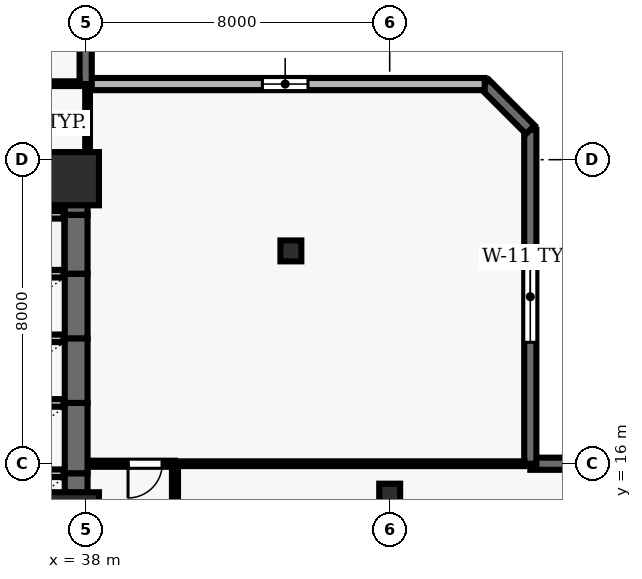
"""IFC4 building model, lengths in metres.
Left out: names, types, materials, properties, quantities, classifications, styles, units other than length and angle.
Written with IfcOpenShell. Run it as: python <this file> out.ifc"""

import sys

from ifc_helpers import new_model, si_unit, direction, frame, frame_2d, origin, origin_2d, place, context, subcontext, project, spatial, rectangle, hollow_rectangle, extrude, element, fill, save


model = new_model("IFC4")
c1 = context("Model", 3, precision=1e-05, world=origin(), true_north=direction((0.0, 1.0)))
c2 = subcontext(c1, "Body", "Model", "MODEL_VIEW")
j1 = project(units=[si_unit("LENGTHUNIT", "METRE"), si_unit("PLANEANGLEUNIT", "RADIAN")], contexts=[c1])
p1 = place(None, origin())
s1 = spatial("IfcSite", under=j1, at=p1, CompositionType="ELEMENT")
p2 = place(p1, origin())
s2 = spatial("IfcBuilding", under=s1, at=p2, CompositionType="ELEMENT")
p3 = place(p2, frame((0.0, 0.0, 73.9)))
s3 = spatial("IfcBuildingStorey", under=s2, at=p3, CompositionType="ELEMENT", Elevation=73.9)
for number, where, z_axis, x_axis in (
    (1, (37.65, 14.55, 0.0), (0.0, 0.0, 1.0), (1.0, 0.0, 0.0)),
    (2, (37.65, 23.5, 0.0), (0.0, 0.0, 1.0), (1.0, 0.0, 0.0)),
):
    element("IfcColumn", number, at=place(p3, frame(where, z_axis=z_axis, x_axis=x_axis)), inside=s3, PredefinedType="COLUMN", context=c2, shape_type="SweptSolid", body=[
        extrude(rectangle(XDim=1.4, YDim=1.4, at=origin_2d()), origin(), (0.0, 0.0, 1.0), 3.9),
    ])
for number, where, z_axis, x_axis in (
    (3, (46.0, 15.2, 0.0), (0.0, 0.0, 1.0), (1.0, 0.0, 0.0)),
    (4, (43.4, 21.6, 0.0), (0.0, 0.0, 1.0), (1.0, 0.0, 0.0)),
):
    element("IfcColumn", number, at=place(p3, frame(where, z_axis=z_axis, x_axis=x_axis)), inside=s3, PredefinedType="COLUMN", context=c2, shape_type="SweptSolid", body=[
        extrude(hollow_rectangle(XDim=0.55, YDim=0.55, WallThickness=0.025, at=origin_2d()), origin(), (0.0, 0.0, 1.0), 3.9),
    ])
p4 = place(p3, frame((73.5, 16.0, 0.0), z_axis=(0.0, 0.0, 1.0), x_axis=(-1.0, 0.0, 0.0)))
e5 = element("IfcWall", 5, at=p4, inside=s3, PredefinedType="SOLIDWALL", context=c2, shape_type="SweptSolid", body=[
    extrude(rectangle(XDim=23.8, YDim=0.32, at=frame_2d((11.9, 0.0))), origin(), (0.0, 0.0, 1.0), 3.69),
])
p5 = place(p4, frame((12.4, 0.0, 0.0)))
e6 = element("IfcOpeningElement", 6, at=p5, cuts=e5, PredefinedType="OPENING", context=c2, shape_type="SweptSolid", body=[
    extrude(rectangle(XDim=1.0, YDim=2.2, at=frame_2d((0.5, 1.1))), frame((0.0, 0.17, 0.0), z_axis=(0.0, -1.0, 0.0), x_axis=(1.0, 0.0, 0.0)), (0.0, 0.0, 1.0), 0.34),
])
p6 = place(p4, frame((2.075, 0.0, 0.9)))
e7 = element("IfcOpeningElement", 7, at=p6, cuts=e5, PredefinedType="OPENING", context=c2, shape_type="SweptSolid", body=[
    extrude(rectangle(XDim=1.8, YDim=2.2, at=frame_2d((0.9, 1.1))), frame((0.0, 0.17, 0.0), z_axis=(0.0, -1.0, 0.0), x_axis=(1.0, 0.0, 0.0)), (0.0, 0.0, 1.0), 0.34),
])
p7 = place(p3, frame((49.7, 16.0, 0.0), z_axis=(0.0, 0.0, 1.0), x_axis=(0.0, 1.0, 0.0)))
e8 = element("IfcWall", 8, at=p7, inside=s3, PredefinedType="SOLIDWALL", context=c2, shape_type="SweptSolid", body=[
    extrude(rectangle(XDim=8.79, YDim=0.32, at=frame_2d((4.395, 0.0))), origin(), (0.0, 0.0, 1.0), 3.69),
])
p8 = place(p7, frame((3.195, 0.0, 0.9)))
e9 = element("IfcOpeningElement", 9, at=p8, cuts=e8, PredefinedType="OPENING", context=c2, shape_type="SweptSolid", body=[
    extrude(rectangle(XDim=2.4, YDim=2.2, at=frame_2d((1.2, 1.1))), frame((0.0, 0.17, 0.0), z_axis=(0.0, -1.0, 0.0), x_axis=(1.0, 0.0, 0.0)), (0.0, 0.0, 1.0), 0.34),
])
p9 = place(p3, frame((49.7, 24.79, 0.0), z_axis=(0.0, 0.0, 1.0), x_axis=(-0.707106781187, 0.707106781187, 0.0)))
e10 = element("IfcWall", 10, at=p9, inside=s3, PredefinedType="SOLIDWALL", context=c2, shape_type="SweptSolid", body=[
    extrude(rectangle(XDim=1.697, YDim=0.32, at=frame_2d((0.849, 0.0))), origin(), (0.0, 0.0, 1.0), 3.69),
])
p10 = place(p3, frame((48.5, 25.99, 0.0), z_axis=(0.0, 0.0, 1.0), x_axis=(-1.0, 0.0, 0.0)))
e11 = element("IfcWall", 11, at=p10, inside=s3, PredefinedType="SOLIDWALL", context=c2, shape_type="SweptSolid", body=[
    extrude(rectangle(XDim=10.5, YDim=0.32, at=frame_2d((5.25, 0.0))), origin(), (0.0, 0.0, 1.0), 3.69),
])
p11 = place(p10, frame((4.65, 0.0, 0.9)))
e12 = element("IfcOpeningElement", 12, at=p11, cuts=e11, PredefinedType="OPENING", context=c2, shape_type="SweptSolid", body=[
    extrude(rectangle(XDim=1.2, YDim=1.6, at=frame_2d((0.6, 0.8))), frame((0.0, 0.17, 0.0), z_axis=(0.0, -1.0, 0.0), x_axis=(1.0, 0.0, 0.0)), (0.0, 0.0, 1.0), 0.34),
])
p12 = place(p3, frame((38.0, 25.99, 0.0), z_axis=(0.0, 0.0, 1.0), x_axis=(0.0, 1.0, 0.0)))
e13 = element("IfcWall", 13, at=p12, inside=s3, PredefinedType="SOLIDWALL", context=c2, shape_type="SweptSolid", body=[
    extrude(rectangle(XDim=25.51, YDim=0.32, at=frame_2d((12.755, 0.0))), origin(), (0.0, 0.0, 1.0), 3.69),
])
p13 = place(p12, frame((12.355, 0.0, 0.0)))
e14 = element("IfcOpeningElement", 14, at=p13, cuts=e13, PredefinedType="OPENING", context=c2, shape_type="SweptSolid", body=[
    extrude(rectangle(XDim=1.0, YDim=2.2, at=frame_2d((0.5, 1.1))), frame((0.0, 0.17, 0.0), z_axis=(0.0, -1.0, 0.0), x_axis=(1.0, 0.0, 0.0)), (0.0, 0.0, 1.0), 0.34),
])
p14 = place(p12, frame((1.539, 0.0, 0.9)))
e15 = element("IfcOpeningElement", 15, at=p14, cuts=e13, PredefinedType="OPENING", context=c2, shape_type="SweptSolid", body=[
    extrude(rectangle(XDim=1.5, YDim=1.6, at=frame_2d((0.75, 0.8))), frame((0.0, 0.17, 0.0), z_axis=(0.0, -1.0, 0.0), x_axis=(1.0, 0.0, 0.0)), (0.0, 0.0, 1.0), 0.34),
])
p15 = place(p12, frame((16.094, 0.0, 0.9)))
e16 = element("IfcOpeningElement", 16, at=p15, cuts=e13, PredefinedType="OPENING", context=c2, shape_type="SweptSolid", body=[
    extrude(rectangle(XDim=1.5, YDim=1.6, at=frame_2d((0.75, 0.8))), frame((0.0, 0.17, 0.0), z_axis=(0.0, -1.0, 0.0), x_axis=(1.0, 0.0, 0.0)), (0.0, 0.0, 1.0), 0.34),
])
p16 = place(p12, frame((21.571, 0.0, 0.9)))
e17 = element("IfcOpeningElement", 17, at=p16, cuts=e13, PredefinedType="OPENING", context=c2, shape_type="SweptSolid", body=[
    extrude(rectangle(XDim=1.5, YDim=1.6, at=frame_2d((0.75, 0.8))), frame((0.0, 0.17, 0.0), z_axis=(0.0, -1.0, 0.0), x_axis=(1.0, 0.0, 0.0)), (0.0, 0.0, 1.0), 0.34),
])
p17 = place(p3, frame((37.75, 13.9, 0.0), z_axis=(0.0, 0.0, 1.0), x_axis=(0.0, 1.0, 0.0)))
e18 = element("IfcWall", 18, at=p17, inside=s3, PredefinedType="SHEAR", context=c2, shape_type="SweptSolid", body=[
    extrude(rectangle(XDim=1.85, YDim=0.6, at=frame_2d((0.925, 0.0))), origin(), (0.0, 0.0, 1.0), 3.69),
])
p18 = place(p3, frame((37.42, 15.75, 0.0), z_axis=(0.0, 0.0, 1.0), x_axis=(-1.0, 0.0, 0.0)))
e19 = element("IfcWall", 19, at=p18, inside=s3, PredefinedType="SOLIDWALL", context=c2, shape_type="SweptSolid", body=[
    extrude(rectangle(XDim=2.14, YDim=0.2, at=frame_2d((1.07, 0.0))), origin(), (0.0, 0.0, 1.0), 3.69),
])
p19 = place(p3, frame((37.75, 15.75, 0.0), z_axis=(0.0, 0.0, 1.0), x_axis=(0.0, 1.0, 0.0)))
e20 = element("IfcWall", 20, at=p19, inside=s3, PredefinedType="SHEAR", context=c2, shape_type="SweptSolid", body=[
    extrude(rectangle(XDim=1.85, YDim=0.6, at=frame_2d((0.925, 0.0))), origin(), (0.0, 0.0, 1.0), 3.69),
])
p20 = place(p3, frame((37.42, 17.6, 0.0), z_axis=(0.0, 0.0, 1.0), x_axis=(-1.0, 0.0, 0.0)))
e21 = element("IfcWall", 21, at=p20, inside=s3, PredefinedType="SOLIDWALL", context=c2, shape_type="SweptSolid", body=[
    extrude(rectangle(XDim=2.14, YDim=0.2, at=frame_2d((1.07, 0.0))), origin(), (0.0, 0.0, 1.0), 3.69),
])
p21 = place(p3, frame((37.75, 17.6, 0.0), z_axis=(0.0, 0.0, 1.0), x_axis=(0.0, 1.0, 0.0)))
e22 = element("IfcWall", 22, at=p21, inside=s3, PredefinedType="SHEAR", context=c2, shape_type="SweptSolid", body=[
    extrude(rectangle(XDim=1.7, YDim=0.6, at=frame_2d((0.85, 0.0))), origin(), (0.0, 0.0, 1.0), 3.69),
])
p22 = place(p3, frame((37.42, 19.3, 0.0), z_axis=(0.0, 0.0, 1.0), x_axis=(-1.0, 0.0, 0.0)))
e23 = element("IfcWall", 23, at=p22, inside=s3, PredefinedType="SOLIDWALL", context=c2, shape_type="SweptSolid", body=[
    extrude(rectangle(XDim=2.14, YDim=0.2, at=frame_2d((1.07, 0.0))), origin(), (0.0, 0.0, 1.0), 3.69),
])
p23 = place(p3, frame((37.75, 19.3, 0.0), z_axis=(0.0, 0.0, 1.0), x_axis=(0.0, 1.0, 0.0)))
e24 = element("IfcWall", 24, at=p23, inside=s3, PredefinedType="SHEAR", context=c2, shape_type="SweptSolid", body=[
    extrude(rectangle(XDim=1.7, YDim=0.6, at=frame_2d((0.85, 0.0))), origin(), (0.0, 0.0, 1.0), 3.69),
])
p24 = place(p3, frame((37.42, 21.0, 0.0), z_axis=(0.0, 0.0, 1.0), x_axis=(-1.0, 0.0, 0.0)))
e25 = element("IfcWall", 25, at=p24, inside=s3, PredefinedType="SOLIDWALL", context=c2, shape_type="SweptSolid", body=[
    extrude(rectangle(XDim=2.14, YDim=0.2, at=frame_2d((1.07, 0.0))), origin(), (0.0, 0.0, 1.0), 3.69),
])
p25 = place(p3, frame((37.75, 21.0, 0.0), z_axis=(0.0, 0.0, 1.0), x_axis=(0.0, 1.0, 0.0)))
e26 = element("IfcWall", 26, at=p25, inside=s3, PredefinedType="SHEAR", context=c2, shape_type="SweptSolid", body=[
    extrude(rectangle(XDim=1.55, YDim=0.6, at=frame_2d((0.775, 0.0))), origin(), (0.0, 0.0, 1.0), 3.69),
])
p26 = place(p3, frame((37.42, 22.55, 0.0), z_axis=(0.0, 0.0, 1.0), x_axis=(-1.0, 0.0, 0.0)))
e27 = element("IfcWall", 27, at=p26, inside=s3, PredefinedType="SOLIDWALL", context=c2, shape_type="SweptSolid", body=[
    extrude(rectangle(XDim=2.14, YDim=0.2, at=frame_2d((1.07, 0.0))), origin(), (0.0, 0.0, 1.0), 3.69),
])
p27 = place(p3, frame((37.75, 22.55, 0.0), z_axis=(0.0, 0.0, 1.0), x_axis=(0.0, 1.0, 0.0)))
e28 = element("IfcWall", 28, at=p27, inside=s3, PredefinedType="SHEAR", context=c2, shape_type="SweptSolid", body=[
    extrude(rectangle(XDim=1.5, YDim=0.6, at=frame_2d((0.75, 0.0))), origin(), (0.0, 0.0, 1.0), 3.69),
])
p28 = place(p3, frame((37.42, 24.05, 0.0), z_axis=(0.0, 0.0, 1.0), x_axis=(-1.0, 0.0, 0.0)))
e29 = element("IfcWall", 29, at=p28, inside=s3, PredefinedType="SOLIDWALL", context=c2, shape_type="SweptSolid", body=[
    extrude(rectangle(XDim=2.14, YDim=0.2, at=frame_2d((1.07, 0.0))), origin(), (0.0, 0.0, 1.0), 3.69),
])
p29 = place(p3, frame((35.15, 26.0, 0.0), z_axis=(0.0, 0.0, 1.0), x_axis=(1.0, 0.0, 0.0)))
e30 = element("IfcWall", 30, at=p29, inside=s3, PredefinedType="PARTITIONING", context=c2, shape_type="SweptSolid", body=[
    extrude(rectangle(XDim=2.695, YDim=0.125, at=frame_2d((1.348, 0.0))), origin(), (0.0, 0.0, 1.0), 3.69),
])
p30 = place(p3, frame((40.35, 16.0, 0.0), z_axis=(0.0, 0.0, 1.0), x_axis=(1.0, 0.0, 0.0)))
e31 = element("IfcWall", 31, at=p30, inside=s3, PredefinedType="PARTITIONING", context=c2, shape_type="SweptSolid", body=[
    extrude(rectangle(XDim=9.195, YDim=0.125, at=frame_2d((4.597, 0.0))), origin(), (0.0, 0.0, 1.0), 3.39),
])
p31 = place(p3, frame((40.35, 16.0, 0.0), z_axis=(0.0, 0.0, 1.0), x_axis=(-1.0, 0.0, 0.0)))
e32 = element("IfcWall", 32, at=p31, inside=s3, PredefinedType="PARTITIONING", context=c2, shape_type="SweptSolid", body=[
    extrude(rectangle(XDim=2.27, YDim=0.16, at=frame_2d((1.135, 0.0))), origin(), (0.0, 0.0, 1.0), 3.69),
])
p32 = place(p31, frame((0.335, 0.0, 0.0)))
e33 = element("IfcOpeningElement", 33, at=p32, cuts=e32, PredefinedType="OPENING", context=c2, shape_type="SweptSolid", body=[
    extrude(rectangle(XDim=0.9, YDim=2.1, at=frame_2d((0.45, 1.05))), frame((0.0, 0.09, 0.0), z_axis=(0.0, -1.0, 0.0), x_axis=(1.0, 0.0, 0.0)), (0.0, 0.0, 1.0), 0.18),
])
p33 = place(p3, frame((38.05, 25.835, 0.0), z_axis=(0.0, 0.0, 1.0), x_axis=(0.0, -1.0, 0.0)))
e34 = element("IfcWall", 34, at=p33, inside=s3, PredefinedType="PARTITIONING", context=c2, shape_type="SweptSolid", body=[
    extrude(rectangle(XDim=1.785, YDim=0.125, at=frame_2d((0.893, 0.0))), origin(), (0.0, 0.0, 1.0), 3.055),
])
p34 = place(p3, frame((40.35, 10.425, 0.0), z_axis=(0.0, 0.0, 1.0), x_axis=(0.0, 1.0, 0.0)))
e35 = element("IfcWall", 35, at=p34, inside=s3, PredefinedType="PARTITIONING", context=c2, shape_type="SweptSolid", body=[
    extrude(rectangle(XDim=5.5, YDim=0.16, at=frame_2d((2.75, 0.0))), origin(), (0.0, 0.0, 1.0), 3.277),
])
p35 = place(p8, origin())
e36 = element("IfcWindow", 36, at=p35, inside=s3, PartitioningType="SINGLE_PANEL", PredefinedType="WINDOW", context=c2, shape_type="SweptSolid", body=[
    extrude(rectangle(XDim=2.4, YDim=2.2, at=frame_2d((1.2, 1.1))), frame((0.0, 0.03, 0.0), z_axis=(0.0, -1.0, 0.0), x_axis=(1.0, 0.0, 0.0)), (0.0, 0.0, 1.0), 0.06),
])
fill(e9, e36)
p36 = place(p11, origin())
e37 = element("IfcWindow", 37, at=p36, inside=s3, PartitioningType="SINGLE_PANEL", PredefinedType="WINDOW", context=c2, shape_type="SweptSolid", body=[
    extrude(rectangle(XDim=1.2, YDim=1.6, at=frame_2d((0.6, 0.8))), frame((0.0, 0.03, 0.0), z_axis=(0.0, -1.0, 0.0), x_axis=(1.0, 0.0, 0.0)), (0.0, 0.0, 1.0), 0.06),
])
fill(e12, e37)
p37 = place(p32, origin())
e38 = element("IfcDoor", 38, at=p37, inside=s3, OperationType="SINGLE_SWING_RIGHT", PredefinedType="DOOR", context=c2, shape_type="SweptSolid", body=[
    extrude(rectangle(XDim=0.9, YDim=2.1, at=frame_2d((0.45, 1.05))), frame((0.0, 0.025, 0.0), z_axis=(0.0, -1.0, 0.0), x_axis=(1.0, 0.0, 0.0)), (0.0, 0.0, 1.0), 0.05),
])
fill(e33, e38)
save(model, sys.argv[1])
